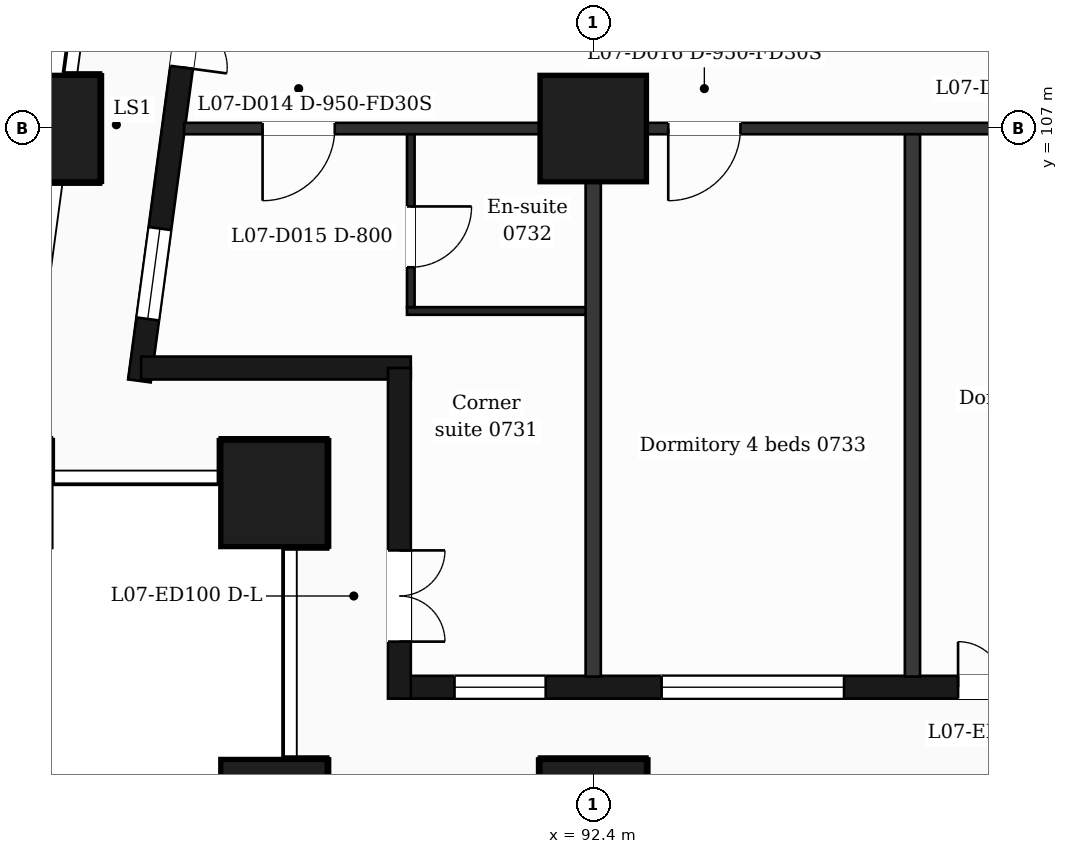
"""IFC4 building model, lengths in metres.
Left out: names, types, materials, properties, quantities, classifications, styles, units other than length and angle.
Written with IfcOpenShell. Run it as: python <this file> out.ifc"""

import sys

from ifc_helpers import new_model, si_unit, direction, frame, frame_2d, origin, origin_2d, place, context, subcontext, project, spatial, rectangle, extrude, element, fill, save


model = new_model("IFC4")
c1 = context("Model", 3, precision=1e-05, world=origin(), true_north=direction((0.0, 1.0)))
c2 = subcontext(c1, "Body", "Model", "MODEL_VIEW")
j1 = project(units=[si_unit("LENGTHUNIT", "METRE"), si_unit("PLANEANGLEUNIT", "RADIAN")], contexts=[c1])
p1 = place(None, origin())
s1 = spatial("IfcSite", under=j1, at=p1, CompositionType="ELEMENT")
p2 = place(p1, origin())
s2 = spatial("IfcBuilding", under=s1, at=p2, CompositionType="ELEMENT")
p3 = place(p2, frame((0.0, 0.0, 42.5)))
s3 = spatial("IfcBuildingStorey", under=s2, at=p3, CompositionType="ELEMENT", Elevation=42.5)
for number, where, z_axis, x_axis in (
    (1, (92.4, 98.0, 0.0), (0.0, 0.0, 1.0), (1.0, 0.0, 0.0)),
    (2, (88.2, 98.0, 0.0), (0.0, 0.0, 1.0), (1.0, 0.0, 0.0)),
    (3, (88.2, 102.2, 0.0), (0.0, 0.0, 1.0), (1.0, 0.0, 0.0)),
    (4, (92.4, 107.0, 0.0), (0.0, 0.0, 1.0), (1.0, 0.0, 0.0)),
    (5, (85.211, 107.0, 0.0), (0.0, 0.0, 1.0), (1.0, 0.0, 0.0)),
):
    element("IfcColumn", number, at=place(p3, frame(where, z_axis=z_axis, x_axis=x_axis)), inside=s3, PredefinedType="COLUMN", context=c2, shape_type="SweptSolid", body=[
        extrude(rectangle(XDim=1.4, YDim=1.4, at=origin_2d()), origin(), (0.0, 0.0, 1.0), 3.5),
    ])
p4 = place(p3, frame((89.85, 99.65, 0.0), z_axis=(0.0, 0.0, 1.0), x_axis=(1.0, 0.0, 0.0)))
e6 = element("IfcWall", 6, at=p4, inside=s3, PredefinedType="SOLIDWALL", context=c2, shape_type="SweptSolid", body=[
    extrude(rectangle(XDim=47.25, YDim=0.3, at=frame_2d((23.625, 0.0))), origin(), (0.0, 0.0, 1.0), 3.18),
])
p5 = place(p4, frame((0.725, 0.0, 0.9)))
e7 = element("IfcOpeningElement", 7, at=p5, cuts=e6, PredefinedType="OPENING", context=c2, shape_type="SweptSolid", body=[
    extrude(rectangle(XDim=1.2, YDim=2.1, at=frame_2d((0.6, 1.05))), frame((0.0, 0.16, 0.0), z_axis=(0.0, -1.0, 0.0), x_axis=(1.0, 0.0, 0.0)), (0.0, 0.0, 1.0), 0.32),
])
p6 = place(p4, frame((3.45, 0.0, 0.9)))
e8 = element("IfcOpeningElement", 8, at=p6, cuts=e6, PredefinedType="OPENING", context=c2, shape_type="SweptSolid", body=[
    extrude(rectangle(XDim=2.4, YDim=2.1, at=frame_2d((1.2, 1.05))), frame((0.0, 0.16, 0.0), z_axis=(0.0, -1.0, 0.0), x_axis=(1.0, 0.0, 0.0)), (0.0, 0.0, 1.0), 0.32),
])
p7 = place(p4, frame((7.35, 0.0, 0.0)))
e9 = element("IfcOpeningElement", 9, at=p7, cuts=e6, PredefinedType="OPENING", context=c2, shape_type="SweptSolid", body=[
    extrude(rectangle(XDim=1.2, YDim=2.4, at=frame_2d((0.6, 1.2))), frame((0.0, 0.16, 0.0), z_axis=(0.0, -1.0, 0.0), x_axis=(1.0, 0.0, 0.0)), (0.0, 0.0, 1.0), 0.32),
])
p8 = place(p4, frame((9.15, 0.0, 0.9)))
e10 = element("IfcOpeningElement", 10, at=p8, cuts=e6, PredefinedType="OPENING", context=c2, shape_type="SweptSolid", body=[
    extrude(rectangle(XDim=1.2, YDim=2.1, at=frame_2d((0.6, 1.05))), frame((0.0, 0.16, 0.0), z_axis=(0.0, -1.0, 0.0), x_axis=(1.0, 0.0, 0.0)), (0.0, 0.0, 1.0), 0.32),
])
p9 = place(p4, frame((11.85, 0.0, 0.9)))
e11 = element("IfcOpeningElement", 11, at=p9, cuts=e6, PredefinedType="OPENING", context=c2, shape_type="SweptSolid", body=[
    extrude(rectangle(XDim=2.4, YDim=2.1, at=frame_2d((1.2, 1.05))), frame((0.0, 0.16, 0.0), z_axis=(0.0, -1.0, 0.0), x_axis=(1.0, 0.0, 0.0)), (0.0, 0.0, 1.0), 0.32),
])
p10 = place(p4, frame((16.05, 0.0, 0.9)))
e12 = element("IfcOpeningElement", 12, at=p10, cuts=e6, PredefinedType="OPENING", context=c2, shape_type="SweptSolid", body=[
    extrude(rectangle(XDim=2.4, YDim=2.1, at=frame_2d((1.2, 1.05))), frame((0.0, 0.16, 0.0), z_axis=(0.0, -1.0, 0.0), x_axis=(1.0, 0.0, 0.0)), (0.0, 0.0, 1.0), 0.32),
])
p11 = place(p4, frame((20.85, 0.0, 0.9)))
e13 = element("IfcOpeningElement", 13, at=p11, cuts=e6, PredefinedType="OPENING", context=c2, shape_type="SweptSolid", body=[
    extrude(rectangle(XDim=1.2, YDim=2.1, at=frame_2d((0.6, 1.05))), frame((0.0, 0.16, 0.0), z_axis=(0.0, -1.0, 0.0), x_axis=(1.0, 0.0, 0.0)), (0.0, 0.0, 1.0), 0.32),
])
p12 = place(p4, frame((25.05, 0.0, 0.9)))
e14 = element("IfcOpeningElement", 14, at=p12, cuts=e6, PredefinedType="OPENING", context=c2, shape_type="SweptSolid", body=[
    extrude(rectangle(XDim=1.2, YDim=2.1, at=frame_2d((0.6, 1.05))), frame((0.0, 0.16, 0.0), z_axis=(0.0, -1.0, 0.0), x_axis=(1.0, 0.0, 0.0)), (0.0, 0.0, 1.0), 0.32),
])
p13 = place(p4, frame((28.65, 0.0, 0.9)))
e15 = element("IfcOpeningElement", 15, at=p13, cuts=e6, PredefinedType="OPENING", context=c2, shape_type="SweptSolid", body=[
    extrude(rectangle(XDim=2.4, YDim=2.1, at=frame_2d((1.2, 1.05))), frame((0.0, 0.16, 0.0), z_axis=(0.0, -1.0, 0.0), x_axis=(1.0, 0.0, 0.0)), (0.0, 0.0, 1.0), 0.32),
])
p14 = place(p4, frame((32.85, 0.0, 0.9)))
e16 = element("IfcOpeningElement", 16, at=p14, cuts=e6, PredefinedType="OPENING", context=c2, shape_type="SweptSolid", body=[
    extrude(rectangle(XDim=2.4, YDim=2.1, at=frame_2d((1.2, 1.05))), frame((0.0, 0.16, 0.0), z_axis=(0.0, -1.0, 0.0), x_axis=(1.0, 0.0, 0.0)), (0.0, 0.0, 1.0), 0.32),
])
p15 = place(p4, frame((37.05, 0.0, 0.9)))
e17 = element("IfcOpeningElement", 17, at=p15, cuts=e6, PredefinedType="OPENING", context=c2, shape_type="SweptSolid", body=[
    extrude(rectangle(XDim=2.4, YDim=2.1, at=frame_2d((1.2, 1.05))), frame((0.0, 0.16, 0.0), z_axis=(0.0, -1.0, 0.0), x_axis=(1.0, 0.0, 0.0)), (0.0, 0.0, 1.0), 0.32),
])
p16 = place(p4, frame((41.25, 0.0, 0.9)))
e18 = element("IfcOpeningElement", 18, at=p16, cuts=e6, PredefinedType="OPENING", context=c2, shape_type="SweptSolid", body=[
    extrude(rectangle(XDim=2.4, YDim=2.1, at=frame_2d((1.2, 1.05))), frame((0.0, 0.16, 0.0), z_axis=(0.0, -1.0, 0.0), x_axis=(1.0, 0.0, 0.0)), (0.0, 0.0, 1.0), 0.32),
])
p17 = place(p4, frame((45.25, 0.0, 0.9)))
e19 = element("IfcOpeningElement", 19, at=p17, cuts=e6, PredefinedType="OPENING", context=c2, shape_type="SweptSolid", body=[
    extrude(rectangle(XDim=1.2, YDim=2.1, at=frame_2d((0.6, 1.05))), frame((0.0, 0.16, 0.0), z_axis=(0.0, -1.0, 0.0), x_axis=(1.0, 0.0, 0.0)), (0.0, 0.0, 1.0), 0.32),
])
p18 = place(p3, frame((87.334, 110.4, 0.0), z_axis=(0.0, 0.0, 1.0), x_axis=(-0.133437175554, -0.991057273915, 0.0)))
e20 = element("IfcWall", 20, at=p18, inside=s3, PredefinedType="SOLIDWALL", context=c2, shape_type="SweptSolid", body=[
    extrude(rectangle(XDim=6.781, YDim=0.3, at=frame_2d((3.39, 0.0))), origin(), (0.0, 0.0, 1.0), 3.18),
])
p19 = place(p18, frame((1.418, 0.0, 0.0)))
e21 = element("IfcOpeningElement", 21, at=p19, cuts=e20, PredefinedType="OPENING", context=c2, shape_type="SweptSolid", body=[
    extrude(rectangle(XDim=1.2, YDim=2.4, at=frame_2d((0.6, 1.2))), frame((0.0, 0.16, 0.0), z_axis=(0.0, -1.0, 0.0), x_axis=(1.0, 0.0, 0.0)), (0.0, 0.0, 1.0), 0.32),
])
p20 = place(p18, frame((4.758, 0.0, 0.9)))
e22 = element("IfcOpeningElement", 22, at=p20, cuts=e20, PredefinedType="OPENING", context=c2, shape_type="SweptSolid", body=[
    extrude(rectangle(XDim=1.2, YDim=2.1, at=frame_2d((0.6, 1.05))), frame((0.0, 0.16, 0.0), z_axis=(0.0, -1.0, 0.0), x_axis=(1.0, 0.0, 0.0)), (0.0, 0.0, 1.0), 0.32),
])
p21 = place(p3, frame((86.452, 103.85, 0.0), z_axis=(0.0, 0.0, 1.0), x_axis=(1.0, 0.0, 0.0)))
e23 = element("IfcWall", 23, at=p21, inside=s3, PredefinedType="SOLIDWALL", context=c2, shape_type="SweptSolid", body=[
    extrude(rectangle(XDim=3.548, YDim=0.3, at=frame_2d((1.774, 0.0))), origin(), (0.0, 0.0, 1.0), 3.18),
])
p22 = place(p3, frame((89.85, 103.85, 0.0), z_axis=(0.0, 0.0, 1.0), x_axis=(0.0, -1.0, 0.0)))
e24 = element("IfcWall", 24, at=p22, inside=s3, PredefinedType="SOLIDWALL", context=c2, shape_type="SweptSolid", body=[
    extrude(rectangle(XDim=4.35, YDim=0.3, at=frame_2d((2.175, 0.0))), origin(), (0.0, 0.0, 1.0), 3.18),
])
p23 = place(p22, frame((2.4, 0.0, 0.0)))
e25 = element("IfcOpeningElement", 25, at=p23, cuts=e24, PredefinedType="OPENING", context=c2, shape_type="SweptSolid", body=[
    extrude(rectangle(XDim=1.2, YDim=2.4, at=frame_2d((0.6, 1.2))), frame((0.0, 0.16, 0.0), z_axis=(0.0, -1.0, 0.0), x_axis=(1.0, 0.0, 0.0)), (0.0, 0.0, 1.0), 0.32),
])
p24 = place(p3, frame((89.95, 104.6, 0.0), z_axis=(0.0, 0.0, 1.0), x_axis=(1.0, 0.0, 0.0)))
e26 = element("IfcWall", 26, at=p24, inside=s3, PredefinedType="PARTITIONING", context=c2, shape_type="SweptSolid", body=[
    extrude(rectangle(XDim=2.45, YDim=0.1, at=frame_2d((1.225, 0.0))), origin(), (0.0, 0.0, 1.0), 3.18),
])
p25 = place(p3, frame((87.018, 107.0, 0.0), z_axis=(0.0, 0.0, 1.0), x_axis=(1.0, 0.0, 0.0)))
e27 = element("IfcWall", 27, at=p25, inside=s3, PredefinedType="PARTITIONING", context=c2, shape_type="SweptSolid", body=[
    extrude(rectangle(XDim=52.765, YDim=0.15, at=frame_2d((26.382, 0.0))), origin(), (0.0, 0.0, 1.0), 3.18),
])
p26 = place(p25, frame((1.032, 0.0, 0.0)))
e28 = element("IfcOpeningElement", 28, at=p26, cuts=e27, PredefinedType="OPENING", context=c2, shape_type="SweptSolid", body=[
    extrude(rectangle(XDim=0.95, YDim=2.1, at=frame_2d((0.475, 1.05))), frame((0.0, 0.085, 0.0), z_axis=(0.0, -1.0, 0.0), x_axis=(1.0, 0.0, 0.0)), (0.0, 0.0, 1.0), 0.17),
])
p27 = place(p25, frame((6.369, 0.0, 0.0)))
e29 = element("IfcOpeningElement", 29, at=p27, cuts=e27, PredefinedType="OPENING", context=c2, shape_type="SweptSolid", body=[
    extrude(rectangle(XDim=0.95, YDim=2.1, at=frame_2d((0.475, 1.05))), frame((0.0, 0.085, 0.0), z_axis=(0.0, -1.0, 0.0), x_axis=(1.0, 0.0, 0.0)), (0.0, 0.0, 1.0), 0.17),
])
p28 = place(p25, frame((10.952, 0.0, 0.0)))
e30 = element("IfcOpeningElement", 30, at=p28, cuts=e27, PredefinedType="OPENING", context=c2, shape_type="SweptSolid", body=[
    extrude(rectangle(XDim=0.95, YDim=2.1, at=frame_2d((0.475, 1.05))), frame((0.0, 0.085, 0.0), z_axis=(0.0, -1.0, 0.0), x_axis=(1.0, 0.0, 0.0)), (0.0, 0.0, 1.0), 0.17),
])
p29 = place(p25, frame((16.045, 0.0, 0.0)))
e31 = element("IfcOpeningElement", 31, at=p29, cuts=e27, PredefinedType="OPENING", context=c2, shape_type="SweptSolid", body=[
    extrude(rectangle(XDim=0.95, YDim=2.1, at=frame_2d((0.475, 1.05))), frame((0.0, 0.085, 0.0), z_axis=(0.0, -1.0, 0.0), x_axis=(1.0, 0.0, 0.0)), (0.0, 0.0, 1.0), 0.17),
])
p30 = place(p25, frame((20.245, 0.0, 0.0)))
e32 = element("IfcOpeningElement", 32, at=p30, cuts=e27, PredefinedType="OPENING", context=c2, shape_type="SweptSolid", body=[
    extrude(rectangle(XDim=0.95, YDim=2.1, at=frame_2d((0.475, 1.05))), frame((0.0, 0.085, 0.0), z_axis=(0.0, -1.0, 0.0), x_axis=(1.0, 0.0, 0.0)), (0.0, 0.0, 1.0), 0.17),
])
p31 = place(p25, frame((24.969, 0.0, 0.0)))
e33 = element("IfcOpeningElement", 33, at=p31, cuts=e27, PredefinedType="OPENING", context=c2, shape_type="SweptSolid", body=[
    extrude(rectangle(XDim=0.95, YDim=2.1, at=frame_2d((0.475, 1.05))), frame((0.0, 0.085, 0.0), z_axis=(0.0, -1.0, 0.0), x_axis=(1.0, 0.0, 0.0)), (0.0, 0.0, 1.0), 0.17),
])
p32 = place(p25, frame((26.807, 0.0, 0.0)))
e34 = element("IfcOpeningElement", 34, at=p32, cuts=e27, PredefinedType="OPENING", context=c2, shape_type="SweptSolid", body=[
    extrude(rectangle(XDim=0.95, YDim=2.1, at=frame_2d((0.475, 1.05))), frame((0.0, 0.085, 0.0), z_axis=(0.0, -1.0, 0.0), x_axis=(1.0, 0.0, 0.0)), (0.0, 0.0, 1.0), 0.17),
])
p33 = place(p25, frame((31.952, 0.0, 0.0)))
e35 = element("IfcOpeningElement", 35, at=p33, cuts=e27, PredefinedType="OPENING", context=c2, shape_type="SweptSolid", body=[
    extrude(rectangle(XDim=0.95, YDim=2.1, at=frame_2d((0.475, 1.05))), frame((0.0, 0.085, 0.0), z_axis=(0.0, -1.0, 0.0), x_axis=(1.0, 0.0, 0.0)), (0.0, 0.0, 1.0), 0.17),
])
p34 = place(p25, frame((40.795, 0.0, 0.0)))
e36 = element("IfcOpeningElement", 36, at=p34, cuts=e27, PredefinedType="OPENING", context=c2, shape_type="SweptSolid", body=[
    extrude(rectangle(XDim=0.95, YDim=2.1, at=frame_2d((0.475, 1.05))), frame((0.0, 0.085, 0.0), z_axis=(0.0, -1.0, 0.0), x_axis=(1.0, 0.0, 0.0)), (0.0, 0.0, 1.0), 0.17),
])
p35 = place(p25, frame((43.644, 0.0, 0.0)))
e37 = element("IfcOpeningElement", 37, at=p35, cuts=e27, PredefinedType="OPENING", context=c2, shape_type="SweptSolid", body=[
    extrude(rectangle(XDim=0.95, YDim=2.1, at=frame_2d((0.475, 1.05))), frame((0.0, 0.085, 0.0), z_axis=(0.0, -1.0, 0.0), x_axis=(1.0, 0.0, 0.0)), (0.0, 0.0, 1.0), 0.17),
])
p36 = place(p25, frame((48.767, 0.0, 0.0)))
e38 = element("IfcOpeningElement", 38, at=p36, cuts=e27, PredefinedType="OPENING", context=c2, shape_type="SweptSolid", body=[
    extrude(rectangle(XDim=0.95, YDim=2.1, at=frame_2d((0.475, 1.05))), frame((0.0, 0.085, 0.0), z_axis=(0.0, -1.0, 0.0), x_axis=(1.0, 0.0, 0.0)), (0.0, 0.0, 1.0), 0.17),
])
p37 = place(p3, frame((90.0, 104.65, 0.0), z_axis=(0.0, 0.0, 1.0), x_axis=(0.0, 1.0, 0.0)))
e39 = element("IfcWall", 39, at=p37, inside=s3, PredefinedType="PARTITIONING", context=c2, shape_type="SweptSolid", body=[
    extrude(rectangle(XDim=2.275, YDim=0.1, at=frame_2d((1.138, 0.0))), origin(), (0.0, 0.0, 1.0), 3.18),
])
p38 = place(p37, frame((0.525, 0.0, 0.0)))
e40 = element("IfcOpeningElement", 40, at=p38, cuts=e39, PredefinedType="OPENING", context=c2, shape_type="SweptSolid", body=[
    extrude(rectangle(XDim=0.8, YDim=2.1, at=frame_2d((0.4, 1.05))), frame((0.0, 0.06, 0.0), z_axis=(0.0, -1.0, 0.0), x_axis=(1.0, 0.0, 0.0)), (0.0, 0.0, 1.0), 0.12),
])
for number, where, z_axis, x_axis in (
    (41, (92.4, 99.79, 0.0), (0.0, 0.0, 1.0), (0.0, 1.0, 0.0)),
    (42, (96.6, 99.79, 0.0), (0.0, 0.0, 1.0), (0.0, 1.0, 0.0)),
):
    element("IfcWall", number, at=place(p3, frame(where, z_axis=z_axis, x_axis=x_axis)), inside=s3, PredefinedType="PARTITIONING", context=c2, shape_type="SweptSolid", body=[
        extrude(rectangle(XDim=7.135, YDim=0.2, at=frame_2d((3.567, 0.0))), origin(), (0.0, 0.0, 1.0), 3.18),
    ])
p39 = place(p5, origin())
e43 = element("IfcWindow", 43, at=p39, inside=s3, PartitioningType="SINGLE_PANEL", PredefinedType="WINDOW", context=c2, shape_type="SweptSolid", body=[
    extrude(rectangle(XDim=1.2, YDim=2.1, at=frame_2d((0.6, 1.05))), frame((0.0, 0.03, 0.0), z_axis=(0.0, -1.0, 0.0), x_axis=(1.0, 0.0, 0.0)), (0.0, 0.0, 1.0), 0.06),
])
fill(e7, e43)
p40 = place(p6, origin())
e44 = element("IfcWindow", 44, at=p40, inside=s3, PartitioningType="SINGLE_PANEL", PredefinedType="WINDOW", context=c2, shape_type="SweptSolid", body=[
    extrude(rectangle(XDim=2.4, YDim=2.1, at=frame_2d((1.2, 1.05))), frame((0.0, 0.03, 0.0), z_axis=(0.0, -1.0, 0.0), x_axis=(1.0, 0.0, 0.0)), (0.0, 0.0, 1.0), 0.06),
])
fill(e8, e44)
p41 = place(p7, origin())
e45 = element("IfcDoor", 45, at=p41, inside=s3, OperationType="DOUBLE_DOOR_SINGLE_SWING", PredefinedType="DOOR", context=c2, shape_type="SweptSolid", body=[
    extrude(rectangle(XDim=1.2, YDim=2.4, at=frame_2d((0.6, 1.2))), frame((0.0, 0.025, 0.0), z_axis=(0.0, -1.0, 0.0), x_axis=(1.0, 0.0, 0.0)), (0.0, 0.0, 1.0), 0.05),
])
fill(e9, e45)
p42 = place(p19, origin())
e46 = element("IfcDoor", 46, at=p42, inside=s3, OperationType="DOUBLE_DOOR_SINGLE_SWING", PredefinedType="DOOR", context=c2, shape_type="SweptSolid", body=[
    extrude(rectangle(XDim=1.2, YDim=2.4, at=frame_2d((0.6, 1.2))), frame((0.0, 0.025, 0.0), z_axis=(0.0, -1.0, 0.0), x_axis=(1.0, 0.0, 0.0)), (0.0, 0.0, 1.0), 0.05),
])
fill(e21, e46)
p43 = place(p20, origin())
e47 = element("IfcWindow", 47, at=p43, inside=s3, PartitioningType="SINGLE_PANEL", PredefinedType="WINDOW", context=c2, shape_type="SweptSolid", body=[
    extrude(rectangle(XDim=1.2, YDim=2.1, at=frame_2d((0.6, 1.05))), frame((0.0, 0.03, 0.0), z_axis=(0.0, -1.0, 0.0), x_axis=(1.0, 0.0, 0.0)), (0.0, 0.0, 1.0), 0.06),
])
fill(e22, e47)
p44 = place(p23, origin())
e48 = element("IfcDoor", 48, at=p44, inside=s3, OperationType="DOUBLE_DOOR_SINGLE_SWING", PredefinedType="DOOR", context=c2, shape_type="SweptSolid", body=[
    extrude(rectangle(XDim=1.2, YDim=2.4, at=frame_2d((0.6, 1.2))), frame((0.0, 0.025, 0.0), z_axis=(0.0, -1.0, 0.0), x_axis=(1.0, 0.0, 0.0)), (0.0, 0.0, 1.0), 0.05),
])
fill(e25, e48)
p45 = place(p26, origin())
e49 = element("IfcDoor", 49, at=p45, inside=s3, OperationType="SINGLE_SWING_LEFT", PredefinedType="DOOR", context=c2, shape_type="SweptSolid", body=[
    extrude(rectangle(XDim=0.95, YDim=2.1, at=frame_2d((0.475, 1.05))), frame((0.0, 0.025, 0.0), z_axis=(0.0, -1.0, 0.0), x_axis=(1.0, 0.0, 0.0)), (0.0, 0.0, 1.0), 0.05),
])
fill(e28, e49)
p46 = place(p38, origin())
e50 = element("IfcDoor", 50, at=p46, inside=s3, OperationType="SINGLE_SWING_RIGHT", PredefinedType="DOOR", context=c2, shape_type="SweptSolid", body=[
    extrude(rectangle(XDim=0.8, YDim=2.1, at=frame_2d((0.4, 1.05))), frame((0.0, 0.025, 0.0), z_axis=(0.0, -1.0, 0.0), x_axis=(1.0, 0.0, 0.0)), (0.0, 0.0, 1.0), 0.05),
])
fill(e40, e50)
p47 = place(p27, origin())
e51 = element("IfcDoor", 51, at=p47, inside=s3, OperationType="SINGLE_SWING_LEFT", PredefinedType="DOOR", context=c2, shape_type="SweptSolid", body=[
    extrude(rectangle(XDim=0.95, YDim=2.1, at=frame_2d((0.475, 1.05))), frame((0.0, 0.025, 0.0), z_axis=(0.0, -1.0, 0.0), x_axis=(1.0, 0.0, 0.0)), (0.0, 0.0, 1.0), 0.05),
])
fill(e29, e51)
save(model, sys.argv[1])
